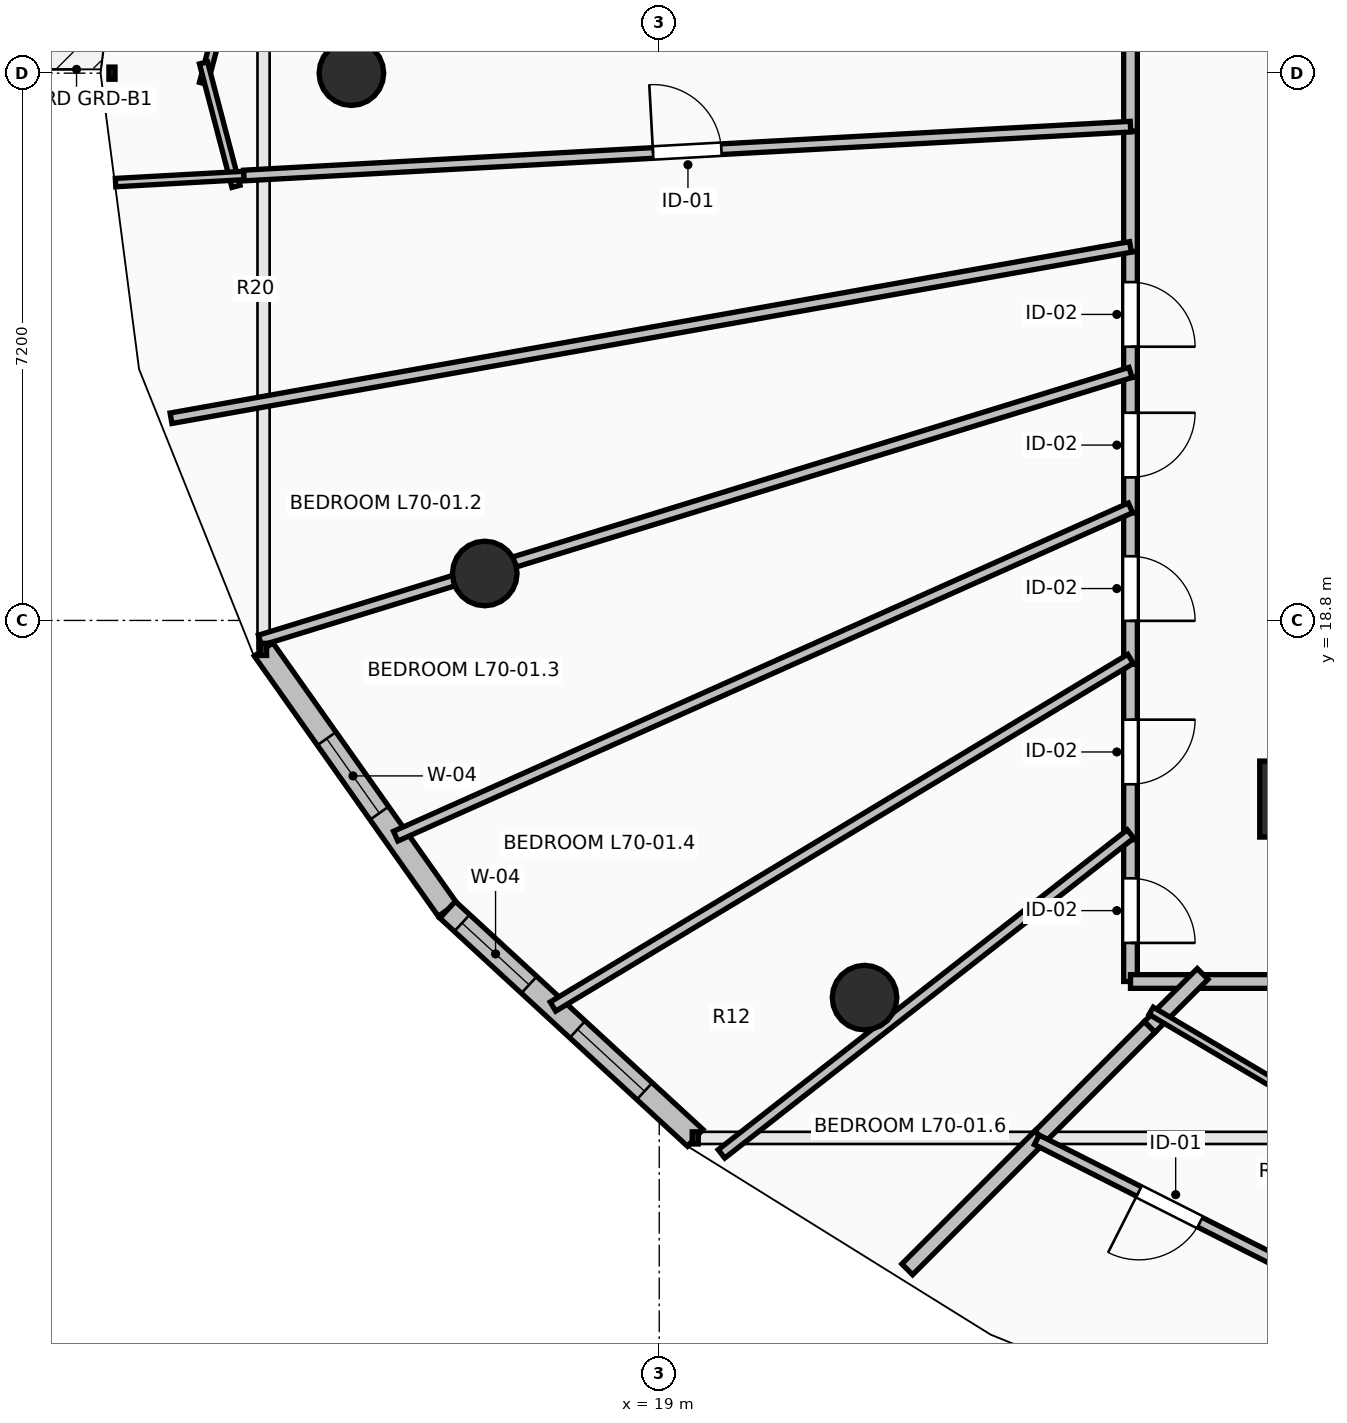
"""IFC4 building model, lengths in metres.
Left out: names, types, materials, properties, quantities, classifications, styles, units other than length and angle.
Written with IfcOpenShell. Run it as: python <this file> out.ifc"""

import sys

from ifc_helpers import new_model, si_unit, direction, frame, frame_2d, origin, origin_2d, place, context, subcontext, project, spatial, rectangle, circle, extrude, element, fill, save


model = new_model("IFC4")
c1 = context("Model", 3, precision=1e-05, world=origin(), true_north=direction((0.0, 1.0)))
c2 = subcontext(c1, "Body", "Model", "MODEL_VIEW")
j1 = project(units=[si_unit("LENGTHUNIT", "METRE"), si_unit("PLANEANGLEUNIT", "RADIAN")], contexts=[c1])
p1 = place(None, origin())
s1 = spatial("IfcSite", under=j1, at=p1, CompositionType="ELEMENT")
p2 = place(p1, origin())
s2 = spatial("IfcBuilding", under=s1, at=p2, CompositionType="ELEMENT")
p3 = place(p2, frame((0.0, 0.0, 259.1)))
s3 = spatial("IfcBuildingStorey", under=s2, at=p3, CompositionType="ELEMENT", Elevation=259.1)
for number, where, z_axis, x_axis in (
    (1, (14.95, 26.0, 0.0), (0.0, 0.0, 1.0), (-1.0, 0.0, 0.0)),
    (2, (16.705, 19.418, 0.0), (0.0, 0.0, 1.0), (-0.924, -0.383, 0.0)),
    (3, (21.701, 13.838, 0.0), (0.0, 0.0, 1.0), (-0.707, -0.707, 0.0)),
):
    element("IfcColumn", number, at=place(p3, frame(where, z_axis=z_axis, x_axis=x_axis)), inside=s3, PredefinedType="COLUMN", context=c2, shape_type="SweptSolid", body=[
        extrude(circle(Radius=0.425, at=origin_2d()), origin(), (0.0, 0.0, 1.0), 3.55),
    ])
p4 = place(p3, frame((27.25, 16.45, 0.0), z_axis=(0.0, 0.0, 1.0), x_axis=(1.0, 0.0, 0.0)))
e4 = element("IfcColumn", 4, at=p4, inside=s3, PredefinedType="PILASTER", context=c2, shape_type="SweptSolid", body=[
    extrude(rectangle(XDim=0.7, YDim=1.0, at=origin_2d()), origin(), (0.0, 0.0, 1.0), 3.55),
])
p5 = place(p3, frame((13.794, 18.419, 0.0), z_axis=(0.0, 0.0, 1.0), x_axis=(0.577261247247, -0.816559521668, 0.0)))
e5 = element("IfcWall", 5, at=p5, inside=s3, PredefinedType="STANDARD", context=c2, shape_type="SweptSolid", body=[
    extrude(rectangle(XDim=4.194, YDim=0.3, at=frame_2d((2.097, 0.0))), origin(), (0.0, 0.0, 1.0), 3.29),
])
p6 = place(p5, frame((1.438, 0.0, 0.85)))
e6 = element("IfcOpeningElement", 6, at=p6, cuts=e5, PredefinedType="OPENING", context=c2, shape_type="SweptSolid", body=[
    extrude(rectangle(XDim=1.2, YDim=1.95, at=frame_2d((0.6, 0.975))), frame((0.0, 0.165, 0.0), z_axis=(0.0, -1.0, 0.0), x_axis=(1.0, 0.0, 0.0)), (0.0, 0.0, 1.0), 0.33),
])
p7 = place(p3, frame((16.216, 14.994, 0.0), z_axis=(0.0, 0.0, 1.0), x_axis=(0.735445373611, -0.677584018727, 0.0)))
e7 = element("IfcWall", 7, at=p7, inside=s3, PredefinedType="STANDARD", context=c2, shape_type="SweptSolid", body=[
    extrude(rectangle(XDim=4.43, YDim=0.3, at=frame_2d((2.215, 0.0))), origin(), (0.0, 0.0, 1.0), 3.29),
])
p8 = place(p7, frame((0.258, 0.0, 0.85)))
e8 = element("IfcOpeningElement", 8, at=p8, cuts=e7, PredefinedType="OPENING", context=c2, shape_type="SweptSolid", body=[
    extrude(rectangle(XDim=1.2, YDim=1.95, at=frame_2d((0.6, 0.975))), frame((0.0, 0.165, 0.0), z_axis=(0.0, -1.0, 0.0), x_axis=(1.0, 0.0, 0.0)), (0.0, 0.0, 1.0), 0.33),
])
p9 = place(p7, frame((2.323, 0.0, 0.85)))
e9 = element("IfcOpeningElement", 9, at=p9, cuts=e7, PredefinedType="OPENING", context=c2, shape_type="SweptSolid", body=[
    extrude(rectangle(XDim=1.2, YDim=1.95, at=frame_2d((0.6, 0.975))), frame((0.0, 0.165, 0.0), z_axis=(0.0, -1.0, 0.0), x_axis=(1.0, 0.0, 0.0)), (0.0, 0.0, 1.0), 0.33),
])
p10 = place(p3, frame((25.2, 28.599, 0.0), z_axis=(0.0, 0.0, 1.0), x_axis=(0.0, -1.0, 0.0)))
e10 = element("IfcWall", 10, at=p10, inside=s3, PredefinedType="PARTITIONING", context=c2, shape_type="SweptSolid", body=[
    extrude(rectangle(XDim=3.363, YDim=0.18, at=frame_2d((1.682, 0.0))), origin(), (0.0, 0.0, 1.0), 2.482),
])
p11 = place(p10, frame((1.181, 0.0, 0.0)))
e11 = element("IfcOpeningElement", 11, at=p11, cuts=e10, PredefinedType="OPENING", context=c2, shape_type="SweptSolid", body=[
    extrude(rectangle(XDim=1.0, YDim=2.15, at=frame_2d((0.5, 1.075))), frame((0.0, 0.105, 0.0), z_axis=(0.0, -1.0, 0.0), x_axis=(1.0, 0.0, 0.0)), (0.0, 0.0, 1.0), 0.21),
])
p12 = place(p3, frame((25.2, 25.236, 0.0), z_axis=(0.0, 0.0, 1.0), x_axis=(0.0, -1.0, 0.0)))
e12 = element("IfcWall", 12, at=p12, inside=s3, PredefinedType="PARTITIONING", context=c2, shape_type="SweptSolid", body=[
    extrude(rectangle(XDim=1.583, YDim=0.18, at=frame_2d((0.792, 0.0))), origin(), (0.0, 0.0, 1.0), 3.29),
])
p13 = place(p3, frame((25.2, 23.653, 0.0), z_axis=(0.0, 0.0, 1.0), x_axis=(0.0, -1.0, 0.0)))
e13 = element("IfcWall", 13, at=p13, inside=s3, PredefinedType="PARTITIONING", context=c2, shape_type="SweptSolid", body=[
    extrude(rectangle(XDim=1.654, YDim=0.18, at=frame_2d((0.827, 0.0))), origin(), (0.0, 0.0, 1.0), 3.29),
])
p14 = place(p13, frame((0.402, 0.0, 0.0)))
e14 = element("IfcOpeningElement", 14, at=p14, cuts=e13, PredefinedType="OPENING", context=c2, shape_type="SweptSolid", body=[
    extrude(rectangle(XDim=0.85, YDim=2.1, at=frame_2d((0.425, 1.05))), frame((0.0, 0.105, 0.0), z_axis=(0.0, -1.0, 0.0), x_axis=(1.0, 0.0, 0.0)), (0.0, 0.0, 1.0), 0.21),
])
p15 = place(p3, frame((25.2, 21.999, 0.0), z_axis=(0.0, 0.0, 1.0), x_axis=(0.0, -1.0, 0.0)))
e15 = element("IfcWall", 15, at=p15, inside=s3, PredefinedType="PARTITIONING", context=c2, shape_type="SweptSolid", body=[
    extrude(rectangle(XDim=1.784, YDim=0.18, at=frame_2d((0.892, 0.0))), origin(), (0.0, 0.0, 1.0), 3.29),
])
p16 = place(p15, frame((0.467, 0.0, 0.0)))
e16 = element("IfcOpeningElement", 16, at=p16, cuts=e15, PredefinedType="OPENING", context=c2, shape_type="SweptSolid", body=[
    extrude(rectangle(XDim=0.85, YDim=2.1, at=frame_2d((0.425, 1.05))), frame((0.0, 0.105, 0.0), z_axis=(0.0, -1.0, 0.0), x_axis=(1.0, 0.0, 0.0)), (0.0, 0.0, 1.0), 0.21),
])
p17 = place(p3, frame((25.2, 20.215, 0.0), z_axis=(0.0, 0.0, 1.0), x_axis=(0.0, -1.0, 0.0)))
e17 = element("IfcWall", 17, at=p17, inside=s3, PredefinedType="PARTITIONING", context=c2, shape_type="SweptSolid", body=[
    extrude(rectangle(XDim=1.991, YDim=0.18, at=frame_2d((0.996, 0.0))), origin(), (0.0, 0.0, 1.0), 3.29),
])
p18 = place(p17, frame((0.571, 0.0, 0.0)))
e18 = element("IfcOpeningElement", 18, at=p18, cuts=e17, PredefinedType="OPENING", context=c2, shape_type="SweptSolid", body=[
    extrude(rectangle(XDim=0.85, YDim=2.1, at=frame_2d((0.425, 1.05))), frame((0.0, 0.105, 0.0), z_axis=(0.0, -1.0, 0.0), x_axis=(1.0, 0.0, 0.0)), (0.0, 0.0, 1.0), 0.21),
])
p19 = place(p3, frame((25.2, 18.224, 0.0), z_axis=(0.0, 0.0, 1.0), x_axis=(0.0, -1.0, 0.0)))
e19 = element("IfcWall", 19, at=p19, inside=s3, PredefinedType="PARTITIONING", context=c2, shape_type="SweptSolid", body=[
    extrude(rectangle(XDim=2.309, YDim=0.18, at=frame_2d((1.155, 0.0))), origin(), (0.0, 0.0, 1.0), 2.482),
])
p20 = place(p19, frame((0.729, 0.0, 0.0)))
e20 = element("IfcOpeningElement", 20, at=p20, cuts=e19, PredefinedType="OPENING", context=c2, shape_type="SweptSolid", body=[
    extrude(rectangle(XDim=0.85, YDim=2.1, at=frame_2d((0.425, 1.05))), frame((0.0, 0.105, 0.0), z_axis=(0.0, -1.0, 0.0), x_axis=(1.0, 0.0, 0.0)), (0.0, 0.0, 1.0), 0.21),
])
p21 = place(p3, frame((25.2, 15.915, 0.0), z_axis=(0.0, 0.0, 1.0), x_axis=(0.0, -1.0, 0.0)))
e21 = element("IfcWall", 21, at=p21, inside=s3, PredefinedType="PARTITIONING", context=c2, shape_type="SweptSolid", body=[
    extrude(rectangle(XDim=1.865, YDim=0.18, at=frame_2d((0.933, 0.0))), origin(), (0.0, 0.0, 1.0), 2.482),
])
p22 = place(p21, frame((0.508, 0.0, 0.0)))
e22 = element("IfcOpeningElement", 22, at=p22, cuts=e21, PredefinedType="OPENING", context=c2, shape_type="SweptSolid", body=[
    extrude(rectangle(XDim=0.85, YDim=2.1, at=frame_2d((0.425, 1.05))), frame((0.0, 0.105, 0.0), z_axis=(0.0, -1.0, 0.0), x_axis=(1.0, 0.0, 0.0)), (0.0, 0.0, 1.0), 0.21),
])
p23 = place(p3, frame((25.2, 14.05, 0.0), z_axis=(0.0, 0.0, 1.0), x_axis=(1.0, 0.0, 0.0)))
e23 = element("IfcWall", 23, at=p23, inside=s3, PredefinedType="PARTITIONING", context=c2, shape_type="SweptSolid", body=[
    extrude(rectangle(XDim=0.91, YDim=0.18, at=frame_2d((0.455, 0.0))), origin(), (0.0, 0.0, 1.0), 3.022),
])
p24 = place(p3, frame((25.97, 14.05, 0.0), z_axis=(0.0, 0.0, 1.0), x_axis=(1.0, 0.0, 0.0)))
e24 = element("IfcWall", 24, at=p24, inside=s3, PredefinedType="PARTITIONING", context=c2, shape_type="SweptSolid", body=[
    extrude(rectangle(XDim=4.124, YDim=0.18, at=frame_2d((2.062, 0.0))), origin(), (0.0, 0.0, 1.0), 2.482),
])
p25 = place(p3, frame((14.203, 30.418, 0.0), z_axis=(0.0, 0.0, 1.0), x_axis=(-0.254460123068, -0.967083267236, 0.0)))
e25 = element("IfcWall", 25, at=p25, inside=s3, PredefinedType="PARTITIONING", context=c2, shape_type="SweptSolid", body=[
    extrude(rectangle(XDim=4.709, YDim=0.11, at=frame_2d((2.354, 0.0))), origin(), (0.0, 0.0, 1.0), 3.29),
])
p26 = place(p25, frame((1.904, 0.0, 0.0)))
e26 = element("IfcOpeningElement", 26, at=p26, cuts=e25, PredefinedType="OPENING", context=c2, shape_type="SweptSolid", body=[
    extrude(rectangle(XDim=0.9, YDim=2.1, at=frame_2d((0.45, 1.05))), frame((0.0, 0.07, 0.0), z_axis=(0.0, -1.0, 0.0), x_axis=(1.0, 0.0, 0.0)), (0.0, 0.0, 1.0), 0.14),
])
p27 = place(p3, frame((13.004, 26.135, 0.0), z_axis=(0.0, 0.0, 1.0), x_axis=(0.254278727694, -0.967130978018, 0.0)))
e27 = element("IfcWall", 27, at=p27, inside=s3, PredefinedType="PARTITIONING", context=c2, shape_type="SweptSolid", body=[
    extrude(rectangle(XDim=1.68, YDim=0.11, at=frame_2d((0.84, 0.0))), origin(), (0.0, 0.0, 1.0), 3.29),
])
p28 = place(p3, frame((13.536, 24.654, 0.0), z_axis=(0.0, 0.0, 1.0), x_axis=(-0.998470551828, -0.055286138695, 0.0)))
e28 = element("IfcWall", 28, at=p28, inside=s3, PredefinedType="PARTITIONING", context=c2, shape_type="SweptSolid", body=[
    extrude(rectangle(XDim=1.691, YDim=0.11, at=frame_2d((0.846, 0.0))), origin(), (0.0, 0.0, 1.0), 3.29),
])
p29 = place(p3, frame((13.536, 24.653, 0.0), z_axis=(0.0, 0.0, 1.0), x_axis=(0.998485968097, 0.055007013313, 0.0)))
e29 = element("IfcWall", 29, at=p29, inside=s3, PredefinedType="PARTITIONING", context=c2, shape_type="SweptSolid", body=[
    extrude(rectangle(XDim=11.682, YDim=0.14, at=frame_2d((5.841, 0.0))), origin(), (0.0, 0.0, 1.0), 2.874),
])
p30 = place(p29, frame((5.391, 0.0, 0.0)))
e30 = element("IfcOpeningElement", 30, at=p30, cuts=e29, PredefinedType="OPENING", context=c2, shape_type="SweptSolid", body=[
    extrude(rectangle(XDim=0.9, YDim=2.1, at=frame_2d((0.45, 1.05))), frame((0.0, 0.085, 0.0), z_axis=(0.0, -1.0, 0.0), x_axis=(1.0, 0.0, 0.0)), (0.0, 0.0, 1.0), 0.17),
])
p31 = place(p3, frame((12.577, 21.46, 0.0), z_axis=(0.0, 0.0, 1.0), x_axis=(0.984427104809, 0.175793274383, 0.0)))
e31 = element("IfcWall", 31, at=p31, inside=s3, PredefinedType="PARTITIONING", context=c2, shape_type="SweptSolid", body=[
    extrude(rectangle(XDim=12.823, YDim=0.14, at=frame_2d((6.411, 0.0))), origin(), (0.0, 0.0, 1.0), 2.874),
])
p32 = place(p3, frame((13.747, 18.539, 0.0), z_axis=(0.0, 0.0, 1.0), x_axis=(0.955802794564, 0.294008533725, 0.0)))
e32 = element("IfcWall", 32, at=p32, inside=s3, PredefinedType="PARTITIONING", context=c2, shape_type="SweptSolid", body=[
    extrude(rectangle(XDim=11.982, YDim=0.14, at=frame_2d((5.991, 0.0))), origin(), (0.0, 0.0, 1.0), 2.482),
])
p33 = place(p3, frame((15.533, 15.962, 0.0), z_axis=(0.0, 0.0, 1.0), x_axis=(0.913015836792, 0.407924112756, 0.0)))
e33 = element("IfcWall", 33, at=p33, inside=s3, PredefinedType="PARTITIONING", context=c2, shape_type="SweptSolid", body=[
    extrude(rectangle(XDim=10.588, YDim=0.14, at=frame_2d((5.294, 0.0))), origin(), (0.0, 0.0, 1.0), 2.482),
])
p34 = place(p3, frame((17.602, 13.72, 0.0), z_axis=(0.0, 0.0, 1.0), x_axis=(0.856734134601, 0.515758298633, 0.0)))
e34 = element("IfcWall", 34, at=p34, inside=s3, PredefinedType="PARTITIONING", context=c2, shape_type="SweptSolid", body=[
    extrude(rectangle(XDim=8.868, YDim=0.14, at=frame_2d((4.434, 0.0))), origin(), (0.0, 0.0, 1.0), 2.482),
])
p35 = place(p3, frame((19.819, 11.782, 0.0), z_axis=(0.0, 0.0, 1.0), x_axis=(0.78765580417, 0.61611552014, 0.0)))
e35 = element("IfcWall", 35, at=p35, inside=s3, PredefinedType="PARTITIONING", context=c2, shape_type="SweptSolid", body=[
    extrude(rectangle(XDim=6.832, YDim=0.14, at=frame_2d((3.416, 0.0))), origin(), (0.0, 0.0, 1.0), 2.482),
])
p36 = place(p3, frame((22.263, 10.263, 0.0), z_axis=(0.0, 0.0, 1.0), x_axis=(0.707106781187, 0.707106781187, 0.0)))
e36 = element("IfcWall", 36, at=p36, inside=s3, PredefinedType="PARTITIONING", context=c2, shape_type="SweptSolid", body=[
    extrude(rectangle(XDim=2.473, YDim=0.2, at=frame_2d((1.237, 0.0))), origin(), (0.0, 0.0, 1.0), 3.29),
])
p37 = place(p3, frame((25.452, 13.452, 0.0), z_axis=(0.0, 0.0, 1.0), x_axis=(0.707106781187, 0.707106781187, 0.0)))
e37 = element("IfcWall", 37, at=p37, inside=s3, PredefinedType="PARTITIONING", context=c2, shape_type="SweptSolid", body=[
    extrude(rectangle(XDim=0.986, YDim=0.2, at=frame_2d((0.493, 0.0))), origin(), (0.0, 0.0, 1.0), 3.022),
])
p38 = place(p3, frame((24.012, 12.012, 0.0), z_axis=(0.0, 0.0, 1.0), x_axis=(0.707106781187, 0.707106781187, 0.0)))
e38 = element("IfcWall", 38, at=p38, inside=s3, PredefinedType="PARTITIONING", context=c2, shape_type="SweptSolid", body=[
    extrude(rectangle(XDim=2.036, YDim=0.2, at=frame_2d((1.018, 0.0))), origin(), (0.0, 0.0, 1.0), 2.874),
])
p39 = place(p3, frame((26.534, 8.132, 0.0), z_axis=(0.0, 0.0, 1.0), x_axis=(0.540114041626, 0.841591838149, 0.0)))
e39 = element("IfcWall", 39, at=p39, inside=s3, PredefinedType="PARTITIONING", context=c2, shape_type="SweptSolid", body=[
    extrude(rectangle(XDim=2.417, YDim=0.11, at=frame_2d((1.208, 0.0))), origin(), (0.0, 0.0, 1.0), 3.29),
])
p40 = place(p3, frame((27.459, 10.203, 0.0), z_axis=(0.0, 0.0, 1.0), x_axis=(-0.892559828496, 0.450928988374, 0.0)))
e40 = element("IfcWall", 40, at=p40, inside=s3, PredefinedType="PARTITIONING", context=c2, shape_type="SweptSolid", body=[
    extrude(rectangle(XDim=3.912, YDim=0.14, at=frame_2d((1.956, 0.0))), origin(), (0.0, 0.0, 1.0), 3.29),
])
p41 = place(p40, frame((1.506, 0.0, 0.0)))
e41 = element("IfcOpeningElement", 41, at=p41, cuts=e40, PredefinedType="OPENING", context=c2, shape_type="SweptSolid", body=[
    extrude(rectangle(XDim=0.9, YDim=2.1, at=frame_2d((0.45, 1.05))), frame((0.0, 0.085, 0.0), z_axis=(0.0, -1.0, 0.0), x_axis=(1.0, 0.0, 0.0)), (0.0, 0.0, 1.0), 0.17),
])
p42 = place(p3, frame((25.472, 13.664, 0.0), z_axis=(0.0, 0.0, 1.0), x_axis=(0.860546797705, -0.509371386082, 0.0)))
e42 = element("IfcWall", 42, at=p42, inside=s3, PredefinedType="PARTITIONING", context=c2, shape_type="SweptSolid", body=[
    extrude(rectangle(XDim=2.485, YDim=0.11, at=frame_2d((1.242, 0.0))), origin(), (0.0, 0.0, 1.0), 3.022),
])
p43 = place(p6, origin())
e43 = element("IfcWindow", 43, at=p43, inside=s3, PartitioningType="SINGLE_PANEL", PredefinedType="WINDOW", context=c2, shape_type="SweptSolid", body=[
    extrude(rectangle(XDim=1.2, YDim=1.95, at=frame_2d((0.6, 0.975))), frame((0.0, 0.03, 0.0), z_axis=(0.0, -1.0, 0.0), x_axis=(1.0, 0.0, 0.0)), (0.0, 0.0, 1.0), 0.06),
])
fill(e6, e43)
p44 = place(p8, origin())
e44 = element("IfcWindow", 44, at=p44, inside=s3, PartitioningType="SINGLE_PANEL", PredefinedType="WINDOW", context=c2, shape_type="SweptSolid", body=[
    extrude(rectangle(XDim=1.2, YDim=1.95, at=frame_2d((0.6, 0.975))), frame((0.0, 0.03, 0.0), z_axis=(0.0, -1.0, 0.0), x_axis=(1.0, 0.0, 0.0)), (0.0, 0.0, 1.0), 0.06),
])
fill(e8, e44)
p45 = place(p9, origin())
e45 = element("IfcWindow", 45, at=p45, inside=s3, PartitioningType="SINGLE_PANEL", PredefinedType="WINDOW", context=c2, shape_type="SweptSolid", body=[
    extrude(rectangle(XDim=1.2, YDim=1.95, at=frame_2d((0.6, 0.975))), frame((0.0, 0.03, 0.0), z_axis=(0.0, -1.0, 0.0), x_axis=(1.0, 0.0, 0.0)), (0.0, 0.0, 1.0), 0.06),
])
fill(e9, e45)
p46 = place(p30, origin())
e46 = element("IfcDoor", 46, at=p46, inside=s3, OperationType="SINGLE_SWING_LEFT", PredefinedType="DOOR", context=c2, shape_type="SweptSolid", body=[
    extrude(rectangle(XDim=0.9, YDim=2.1, at=frame_2d((0.45, 1.05))), frame((0.0, 0.025, 0.0), z_axis=(0.0, -1.0, 0.0), x_axis=(1.0, 0.0, 0.0)), (0.0, 0.0, 1.0), 0.05),
])
fill(e30, e46)
p47 = place(p41, origin())
e47 = element("IfcDoor", 47, at=p47, inside=s3, OperationType="SINGLE_SWING_RIGHT", PredefinedType="DOOR", context=c2, shape_type="SweptSolid", body=[
    extrude(rectangle(XDim=0.9, YDim=2.1, at=frame_2d((0.45, 1.05))), frame((0.0, 0.025, 0.0), z_axis=(0.0, -1.0, 0.0), x_axis=(1.0, 0.0, 0.0)), (0.0, 0.0, 1.0), 0.05),
])
fill(e41, e47)
p48 = place(p14, origin())
e48 = element("IfcDoor", 48, at=p48, inside=s3, OperationType="SINGLE_SWING_RIGHT", PredefinedType="DOOR", context=c2, shape_type="SweptSolid", body=[
    extrude(rectangle(XDim=0.85, YDim=2.1, at=frame_2d((0.425, 1.05))), frame((0.0, 0.025, 0.0), z_axis=(0.0, -1.0, 0.0), x_axis=(1.0, 0.0, 0.0)), (0.0, 0.0, 1.0), 0.05),
])
fill(e14, e48)
p49 = place(p16, origin())
e49 = element("IfcDoor", 49, at=p49, inside=s3, OperationType="SINGLE_SWING_LEFT", PredefinedType="DOOR", context=c2, shape_type="SweptSolid", body=[
    extrude(rectangle(XDim=0.85, YDim=2.1, at=frame_2d((0.425, 1.05))), frame((0.0, 0.025, 0.0), z_axis=(0.0, -1.0, 0.0), x_axis=(1.0, 0.0, 0.0)), (0.0, 0.0, 1.0), 0.05),
])
fill(e16, e49)
p50 = place(p18, origin())
e50 = element("IfcDoor", 50, at=p50, inside=s3, OperationType="SINGLE_SWING_RIGHT", PredefinedType="DOOR", context=c2, shape_type="SweptSolid", body=[
    extrude(rectangle(XDim=0.85, YDim=2.1, at=frame_2d((0.425, 1.05))), frame((0.0, 0.025, 0.0), z_axis=(0.0, -1.0, 0.0), x_axis=(1.0, 0.0, 0.0)), (0.0, 0.0, 1.0), 0.05),
])
fill(e18, e50)
p51 = place(p20, origin())
e51 = element("IfcDoor", 51, at=p51, inside=s3, OperationType="SINGLE_SWING_LEFT", PredefinedType="DOOR", context=c2, shape_type="SweptSolid", body=[
    extrude(rectangle(XDim=0.85, YDim=2.1, at=frame_2d((0.425, 1.05))), frame((0.0, 0.025, 0.0), z_axis=(0.0, -1.0, 0.0), x_axis=(1.0, 0.0, 0.0)), (0.0, 0.0, 1.0), 0.05),
])
fill(e20, e51)
p52 = place(p22, origin())
e52 = element("IfcDoor", 52, at=p52, inside=s3, OperationType="SINGLE_SWING_RIGHT", PredefinedType="DOOR", context=c2, shape_type="SweptSolid", body=[
    extrude(rectangle(XDim=0.85, YDim=2.1, at=frame_2d((0.425, 1.05))), frame((0.0, 0.025, 0.0), z_axis=(0.0, -1.0, 0.0), x_axis=(1.0, 0.0, 0.0)), (0.0, 0.0, 1.0), 0.05),
])
fill(e22, e52)
save(model, sys.argv[1])
